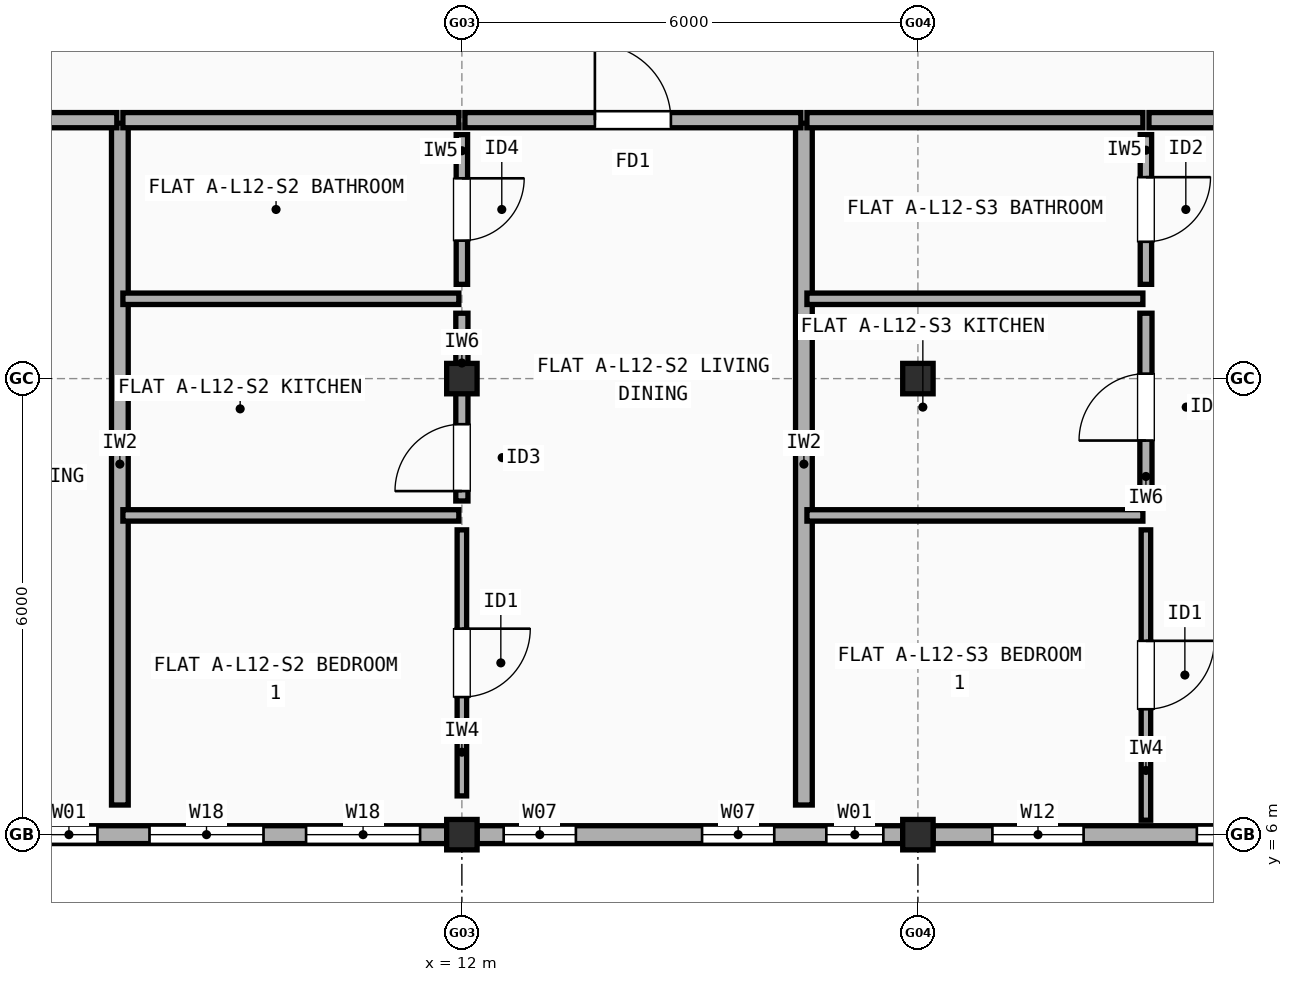
"""IFC4 building model, lengths in metres.
Left out: names, types, materials, properties, quantities, classifications, styles, units other than length and angle.
Written with IfcOpenShell. Run it as: python <this file> out.ifc"""

import sys

from ifc_helpers import new_model, si_unit, direction, frame, frame_2d, origin, origin_2d, place, context, subcontext, project, spatial, rectangle, extrude, element, fill, save


model = new_model("IFC4")
c1 = context("Model", 3, precision=1e-05, world=origin(), true_north=direction((0.0, 1.0)))
c2 = subcontext(c1, "Body", "Model", "MODEL_VIEW")
j1 = project(units=[si_unit("LENGTHUNIT", "METRE"), si_unit("PLANEANGLEUNIT", "RADIAN")], contexts=[c1])
p1 = place(None, origin())
s1 = spatial("IfcSite", under=j1, at=p1, CompositionType="ELEMENT")
p2 = place(p1, origin())
s2 = spatial("IfcBuilding", under=s1, at=p2, CompositionType="ELEMENT")
p3 = place(p2, frame((0.0, 0.0, 39.7)))
s3 = spatial("IfcBuildingStorey", under=s2, at=p3, CompositionType="ELEMENT", Elevation=39.7)
for number, where, z_axis, x_axis in (
    (1, (12.0, 6.0, 0.0), (0.0, 0.0, 1.0), (1.0, 0.0, 0.0)),
    (2, (12.0, 12.0, 0.0), (0.0, 0.0, 1.0), (1.0, 0.0, 0.0)),
    (3, (18.0, 6.0, 0.0), (0.0, 0.0, 1.0), (1.0, 0.0, 0.0)),
    (4, (18.0, 12.0, 0.0), (0.0, 0.0, 1.0), (1.0, 0.0, 0.0)),
):
    element("IfcColumn", number, at=place(p3, frame(where, z_axis=z_axis, x_axis=x_axis)), inside=s3, PredefinedType="COLUMN", context=c2, shape_type="SweptSolid", body=[
        extrude(rectangle(XDim=0.4, YDim=0.4, at=origin_2d()), origin(), (0.0, 0.0, 1.0), 3.0),
    ])
p4 = place(p3, frame((6.2, 6.0, 0.0), z_axis=(0.0, 0.0, 1.0), x_axis=(1.0, 0.0, 0.0)))
e5 = element("IfcWall", 5, at=p4, inside=s3, PredefinedType="STANDARD", context=c2, shape_type="SweptSolid", body=[
    extrude(rectangle(XDim=5.6, YDim=0.235, at=frame_2d((2.8, 0.0))), origin(), (0.0, 0.0, 1.0), 2.482),
])
p5 = place(p4, frame((0.255, 0.0, 0.9)))
e6 = element("IfcOpeningElement", 6, at=p5, cuts=e5, PredefinedType="OPENING", context=c2, shape_type="SweptSolid", body=[
    extrude(rectangle(XDim=0.75, YDim=1.15, at=frame_2d((0.375, 0.575))), frame((0.0, 0.127, 0.0), z_axis=(0.0, -1.0, 0.0), x_axis=(1.0, 0.0, 0.0)), (0.0, 0.0, 1.0), 0.255),
])
p6 = place(p4, frame((1.69, 0.0, 0.9)))
e7 = element("IfcOpeningElement", 7, at=p6, cuts=e5, PredefinedType="OPENING", context=c2, shape_type="SweptSolid", body=[
    extrude(rectangle(XDim=1.5, YDim=1.4, at=frame_2d((0.75, 0.7))), frame((0.0, 0.127, 0.0), z_axis=(0.0, -1.0, 0.0), x_axis=(1.0, 0.0, 0.0)), (0.0, 0.0, 1.0), 0.255),
])
p7 = place(p4, frame((3.75, 0.0, 0.9)))
e8 = element("IfcOpeningElement", 8, at=p7, cuts=e5, PredefinedType="OPENING", context=c2, shape_type="SweptSolid", body=[
    extrude(rectangle(XDim=1.5, YDim=1.4, at=frame_2d((0.75, 0.7))), frame((0.0, 0.127, 0.0), z_axis=(0.0, -1.0, 0.0), x_axis=(1.0, 0.0, 0.0)), (0.0, 0.0, 1.0), 0.255),
])
p8 = place(p3, frame((12.2, 6.0, 0.0), z_axis=(0.0, 0.0, 1.0), x_axis=(1.0, 0.0, 0.0)))
e9 = element("IfcWall", 9, at=p8, inside=s3, PredefinedType="STANDARD", context=c2, shape_type="SweptSolid", body=[
    extrude(rectangle(XDim=5.6, YDim=0.235, at=frame_2d((2.8, 0.0))), origin(), (0.0, 0.0, 1.0), 2.482),
])
p9 = place(p8, frame((0.35, 0.0, 0.9)))
e10 = element("IfcOpeningElement", 10, at=p9, cuts=e9, PredefinedType="OPENING", context=c2, shape_type="SweptSolid", body=[
    extrude(rectangle(XDim=0.95, YDim=1.35, at=frame_2d((0.475, 0.675))), frame((0.0, 0.127, 0.0), z_axis=(0.0, -1.0, 0.0), x_axis=(1.0, 0.0, 0.0)), (0.0, 0.0, 1.0), 0.255),
])
p10 = place(p8, frame((2.96, 0.0, 0.9)))
e11 = element("IfcOpeningElement", 11, at=p10, cuts=e9, PredefinedType="OPENING", context=c2, shape_type="SweptSolid", body=[
    extrude(rectangle(XDim=0.95, YDim=1.35, at=frame_2d((0.475, 0.675))), frame((0.0, 0.127, 0.0), z_axis=(0.0, -1.0, 0.0), x_axis=(1.0, 0.0, 0.0)), (0.0, 0.0, 1.0), 0.255),
])
p11 = place(p8, frame((4.595, 0.0, 0.9)))
e12 = element("IfcOpeningElement", 12, at=p11, cuts=e9, PredefinedType="OPENING", context=c2, shape_type="SweptSolid", body=[
    extrude(rectangle(XDim=0.75, YDim=1.15, at=frame_2d((0.375, 0.575))), frame((0.0, 0.127, 0.0), z_axis=(0.0, -1.0, 0.0), x_axis=(1.0, 0.0, 0.0)), (0.0, 0.0, 1.0), 0.255),
])
p12 = place(p3, frame((18.2, 6.0, 0.0), z_axis=(0.0, 0.0, 1.0), x_axis=(1.0, 0.0, 0.0)))
e13 = element("IfcWall", 13, at=p12, inside=s3, PredefinedType="STANDARD", context=c2, shape_type="SweptSolid", body=[
    extrude(rectangle(XDim=5.6, YDim=0.235, at=frame_2d((2.8, 0.0))), origin(), (0.0, 0.0, 1.0), 2.482),
])
p13 = place(p12, frame((0.78, 0.0, 0.9)))
e14 = element("IfcOpeningElement", 14, at=p13, cuts=e13, PredefinedType="OPENING", context=c2, shape_type="SweptSolid", body=[
    extrude(rectangle(XDim=1.2, YDim=1.35, at=frame_2d((0.6, 0.675))), frame((0.0, 0.127, 0.0), z_axis=(0.0, -1.0, 0.0), x_axis=(1.0, 0.0, 0.0)), (0.0, 0.0, 1.0), 0.255),
])
p14 = place(p12, frame((3.47, 0.0, 0.9)))
e15 = element("IfcOpeningElement", 15, at=p14, cuts=e13, PredefinedType="OPENING", context=c2, shape_type="SweptSolid", body=[
    extrude(rectangle(XDim=1.5, YDim=1.4, at=frame_2d((0.75, 0.7))), frame((0.0, 0.127, 0.0), z_axis=(0.0, -1.0, 0.0), x_axis=(1.0, 0.0, 0.0)), (0.0, 0.0, 1.0), 0.255),
])
p15 = place(p3, frame((7.5, 6.39, 0.0), z_axis=(0.0, 0.0, 1.0), x_axis=(0.0, 1.0, 0.0)))
e16 = element("IfcWall", 16, at=p15, inside=s3, PredefinedType="SOLIDWALL", context=c2, shape_type="SweptSolid", body=[
    extrude(rectangle(XDim=8.97, YDim=0.22, at=frame_2d((4.485, 0.0))), origin(), (0.0, 0.0, 1.0), 2.532),
])
p16 = place(p3, frame((3.04, 15.4, 0.0), z_axis=(0.0, 0.0, 1.0), x_axis=(1.0, 0.0, 0.0)))
e17 = element("IfcWall", 17, at=p16, inside=s3, PredefinedType="SOLIDWALL", context=c2, shape_type="SweptSolid", body=[
    extrude(rectangle(XDim=4.42, YDim=0.2, at=frame_2d((2.21, 0.0))), origin(), (0.0, 0.0, 1.0), 2.458),
])
p17 = place(p16, frame((1.685, 0.0, 0.0)))
e18 = element("IfcOpeningElement", 18, at=p17, cuts=e17, PredefinedType="OPENING", context=c2, shape_type="SweptSolid", body=[
    extrude(rectangle(XDim=1.05, YDim=2.15, at=frame_2d((0.525, 1.075))), frame((0.0, 0.11, 0.0), z_axis=(0.0, -1.0, 0.0), x_axis=(1.0, 0.0, 0.0)), (0.0, 0.0, 1.0), 0.22),
])
p18 = place(p3, frame((16.5, 6.39, 0.0), z_axis=(0.0, 0.0, 1.0), x_axis=(0.0, 1.0, 0.0)))
e19 = element("IfcWall", 19, at=p18, inside=s3, PredefinedType="SOLIDWALL", context=c2, shape_type="SweptSolid", body=[
    extrude(rectangle(XDim=8.97, YDim=0.22, at=frame_2d((4.485, 0.0))), origin(), (0.0, 0.0, 1.0), 2.532),
])
p19 = place(p3, frame((7.54, 15.4, 0.0), z_axis=(0.0, 0.0, 1.0), x_axis=(1.0, 0.0, 0.0)))
e20 = element("IfcWall", 20, at=p19, inside=s3, PredefinedType="SOLIDWALL", context=c2, shape_type="SweptSolid", body=[
    extrude(rectangle(XDim=4.42, YDim=0.2, at=frame_2d((2.21, 0.0))), origin(), (0.0, 0.0, 1.0), 2.458),
])
p20 = place(p3, frame((12.04, 15.4, 0.0), z_axis=(0.0, 0.0, 1.0), x_axis=(1.0, 0.0, 0.0)))
e21 = element("IfcWall", 21, at=p20, inside=s3, PredefinedType="SOLIDWALL", context=c2, shape_type="SweptSolid", body=[
    extrude(rectangle(XDim=4.42, YDim=0.2, at=frame_2d((2.21, 0.0))), origin(), (0.0, 0.0, 1.0), 2.458),
])
p21 = place(p20, frame((1.71, 0.0, 0.0)))
e22 = element("IfcOpeningElement", 22, at=p21, cuts=e21, PredefinedType="OPENING", context=c2, shape_type="SweptSolid", body=[
    extrude(rectangle(XDim=1.0, YDim=2.15, at=frame_2d((0.5, 1.075))), frame((0.0, 0.11, 0.0), z_axis=(0.0, -1.0, 0.0), x_axis=(1.0, 0.0, 0.0)), (0.0, 0.0, 1.0), 0.22),
])
p22 = place(p3, frame((12.0, 6.51, 0.0), z_axis=(0.0, 0.0, 1.0), x_axis=(0.0, 1.0, 0.0)))
e23 = element("IfcWall", 23, at=p22, inside=s3, PredefinedType="PARTITIONING", context=c2, shape_type="SweptSolid", body=[
    extrude(rectangle(XDim=3.5, YDim=0.125, at=frame_2d((1.75, 0.0))), origin(), (0.0, 0.0, 1.0), 2.508),
])
p23 = place(p22, frame((1.3, 0.0, 0.0)))
e24 = element("IfcOpeningElement", 24, at=p23, cuts=e23, PredefinedType="OPENING", context=c2, shape_type="SweptSolid", body=[
    extrude(rectangle(XDim=0.9, YDim=2.1, at=frame_2d((0.45, 1.05))), frame((0.0, 0.073, 0.0), z_axis=(0.0, -1.0, 0.0), x_axis=(1.0, 0.0, 0.0)), (0.0, 0.0, 1.0), 0.145),
])
p24 = place(p3, frame((12.0, 10.39, 0.0), z_axis=(0.0, 0.0, 1.0), x_axis=(0.0, 1.0, 0.0)))
e25 = element("IfcWall", 25, at=p24, inside=s3, PredefinedType="PLUMBINGWALL", context=c2, shape_type="SweptSolid", body=[
    extrude(rectangle(XDim=2.47, YDim=0.16, at=frame_2d((1.235, 0.0))), origin(), (0.0, 0.0, 1.0), 2.458),
])
p25 = place(p24, frame((0.13, 0.0, 0.0)))
e26 = element("IfcOpeningElement", 26, at=p25, cuts=e25, PredefinedType="OPENING", context=c2, shape_type="SweptSolid", body=[
    extrude(rectangle(XDim=0.88, YDim=2.1, at=frame_2d((0.44, 1.05))), frame((0.0, 0.09, 0.0), z_axis=(0.0, -1.0, 0.0), x_axis=(1.0, 0.0, 0.0)), (0.0, 0.0, 1.0), 0.18),
])
p26 = place(p3, frame((12.0, 13.24, 0.0), z_axis=(0.0, 0.0, 1.0), x_axis=(0.0, 1.0, 0.0)))
e27 = element("IfcWall", 27, at=p26, inside=s3, PredefinedType="PARTITIONING", context=c2, shape_type="SweptSolid", body=[
    extrude(rectangle(XDim=1.97, YDim=0.15, at=frame_2d((0.985, 0.0))), origin(), (0.0, 0.0, 1.0), 2.458),
])
p27 = place(p26, frame((0.575, 0.0, 0.0)))
e28 = element("IfcOpeningElement", 28, at=p27, cuts=e27, PredefinedType="OPENING", context=c2, shape_type="SweptSolid", body=[
    extrude(rectangle(XDim=0.82, YDim=2.08, at=frame_2d((0.41, 1.04))), frame((0.0, 0.085, 0.0), z_axis=(0.0, -1.0, 0.0), x_axis=(1.0, 0.0, 0.0)), (0.0, 0.0, 1.0), 0.17),
])
p28 = place(p3, frame((7.54, 10.2, 0.0), z_axis=(0.0, 0.0, 1.0), x_axis=(1.0, 0.0, 0.0)))
e29 = element("IfcWall", 29, at=p28, inside=s3, PredefinedType="PARTITIONING", context=c2, shape_type="SweptSolid", body=[
    extrude(rectangle(XDim=4.42, YDim=0.15, at=frame_2d((2.21, 0.0))), origin(), (0.0, 0.0, 1.0), 2.508),
])
p29 = place(p3, frame((7.54, 13.05, 0.0), z_axis=(0.0, 0.0, 1.0), x_axis=(1.0, 0.0, 0.0)))
e30 = element("IfcWall", 30, at=p29, inside=s3, PredefinedType="PARTITIONING", context=c2, shape_type="SweptSolid", body=[
    extrude(rectangle(XDim=4.42, YDim=0.15, at=frame_2d((2.21, 0.0))), origin(), (0.0, 0.0, 1.0), 2.458),
])
p30 = place(p3, frame((16.54, 15.4, 0.0), z_axis=(0.0, 0.0, 1.0), x_axis=(1.0, 0.0, 0.0)))
e31 = element("IfcWall", 31, at=p30, inside=s3, PredefinedType="SOLIDWALL", context=c2, shape_type="SweptSolid", body=[
    extrude(rectangle(XDim=4.42, YDim=0.2, at=frame_2d((2.21, 0.0))), origin(), (0.0, 0.0, 1.0), 2.548),
])
p31 = place(p3, frame((21.04, 15.4, 0.0), z_axis=(0.0, 0.0, 1.0), x_axis=(1.0, 0.0, 0.0)))
e32 = element("IfcWall", 32, at=p31, inside=s3, PredefinedType="SOLIDWALL", context=c2, shape_type="SweptSolid", body=[
    extrude(rectangle(XDim=5.92, YDim=0.2, at=frame_2d((2.96, 0.0))), origin(), (0.0, 0.0, 1.0), 2.548),
])
p32 = place(p31, frame((2.47, 0.0, 0.0)))
e33 = element("IfcOpeningElement", 33, at=p32, cuts=e32, PredefinedType="OPENING", context=c2, shape_type="SweptSolid", body=[
    extrude(rectangle(XDim=0.98, YDim=2.15, at=frame_2d((0.49, 1.075))), frame((0.0, 0.11, 0.0), z_axis=(0.0, -1.0, 0.0), x_axis=(1.0, 0.0, 0.0)), (0.0, 0.0, 1.0), 0.22),
])
p33 = place(p3, frame((21.0, 6.19, 0.0), z_axis=(0.0, 0.0, 1.0), x_axis=(0.0, 1.0, 0.0)))
e34 = element("IfcWall", 34, at=p33, inside=s3, PredefinedType="PARTITIONING", context=c2, shape_type="SweptSolid", body=[
    extrude(rectangle(XDim=3.82, YDim=0.125, at=frame_2d((1.91, 0.0))), origin(), (0.0, 0.0, 1.0), 3.0),
])
p34 = place(p33, frame((1.46, 0.0, 0.0)))
e35 = element("IfcOpeningElement", 35, at=p34, cuts=e34, PredefinedType="OPENING", context=c2, shape_type="SweptSolid", body=[
    extrude(rectangle(XDim=0.9, YDim=2.1, at=frame_2d((0.45, 1.05))), frame((0.0, 0.073, 0.0), z_axis=(0.0, -1.0, 0.0), x_axis=(1.0, 0.0, 0.0)), (0.0, 0.0, 1.0), 0.145),
])
p35 = place(p3, frame((21.0, 10.39, 0.0), z_axis=(0.0, 0.0, 1.0), x_axis=(0.0, 1.0, 0.0)))
e36 = element("IfcWall", 36, at=p35, inside=s3, PredefinedType="PLUMBINGWALL", context=c2, shape_type="SweptSolid", body=[
    extrude(rectangle(XDim=2.47, YDim=0.16, at=frame_2d((1.235, 0.0))), origin(), (0.0, 0.0, 1.0), 2.532),
])
p36 = place(p35, frame((0.795, 0.0, 0.0)))
e37 = element("IfcOpeningElement", 37, at=p36, cuts=e36, PredefinedType="OPENING", context=c2, shape_type="SweptSolid", body=[
    extrude(rectangle(XDim=0.88, YDim=2.1, at=frame_2d((0.44, 1.05))), frame((0.0, 0.09, 0.0), z_axis=(0.0, -1.0, 0.0), x_axis=(1.0, 0.0, 0.0)), (0.0, 0.0, 1.0), 0.18),
])
p37 = place(p3, frame((21.0, 13.24, 0.0), z_axis=(0.0, 0.0, 1.0), x_axis=(0.0, 1.0, 0.0)))
e38 = element("IfcWall", 38, at=p37, inside=s3, PredefinedType="PARTITIONING", context=c2, shape_type="SweptSolid", body=[
    extrude(rectangle(XDim=1.97, YDim=0.15, at=frame_2d((0.985, 0.0))), origin(), (0.0, 0.0, 1.0), 3.0),
])
p38 = place(p37, frame((0.56, 0.0, 0.0)))
e39 = element("IfcOpeningElement", 39, at=p38, cuts=e38, PredefinedType="OPENING", context=c2, shape_type="SweptSolid", body=[
    extrude(rectangle(XDim=0.85, YDim=2.1, at=frame_2d((0.425, 1.05))), frame((0.0, 0.085, 0.0), z_axis=(0.0, -1.0, 0.0), x_axis=(1.0, 0.0, 0.0)), (0.0, 0.0, 1.0), 0.17),
])
p39 = place(p3, frame((16.54, 10.2, 0.0), z_axis=(0.0, 0.0, 1.0), x_axis=(1.0, 0.0, 0.0)))
e40 = element("IfcWall", 40, at=p39, inside=s3, PredefinedType="PARTITIONING", context=c2, shape_type="SweptSolid", body=[
    extrude(rectangle(XDim=4.42, YDim=0.15, at=frame_2d((2.21, 0.0))), origin(), (0.0, 0.0, 1.0), 2.458),
])
p40 = place(p3, frame((16.54, 13.05, 0.0), z_axis=(0.0, 0.0, 1.0), x_axis=(1.0, 0.0, 0.0)))
e41 = element("IfcWall", 41, at=p40, inside=s3, PredefinedType="PARTITIONING", context=c2, shape_type="SweptSolid", body=[
    extrude(rectangle(XDim=4.42, YDim=0.15, at=frame_2d((2.21, 0.0))), origin(), (0.0, 0.0, 1.0), 2.548),
])
p41 = place(p5, origin())
e42 = element("IfcWindow", 42, at=p41, inside=s3, PartitioningType="SINGLE_PANEL", PredefinedType="WINDOW", context=c2, shape_type="SweptSolid", body=[
    extrude(rectangle(XDim=0.75, YDim=1.15, at=frame_2d((0.375, 0.575))), frame((0.0, 0.03, 0.0), z_axis=(0.0, -1.0, 0.0), x_axis=(1.0, 0.0, 0.0)), (0.0, 0.0, 1.0), 0.06),
])
fill(e6, e42)
p42 = place(p6, origin())
e43 = element("IfcWindow", 43, at=p42, inside=s3, PartitioningType="SINGLE_PANEL", PredefinedType="WINDOW", context=c2, shape_type="SweptSolid", body=[
    extrude(rectangle(XDim=1.5, YDim=1.4, at=frame_2d((0.75, 0.7))), frame((0.0, 0.03, 0.0), z_axis=(0.0, -1.0, 0.0), x_axis=(1.0, 0.0, 0.0)), (0.0, 0.0, 1.0), 0.06),
])
fill(e7, e43)
p43 = place(p7, origin())
e44 = element("IfcWindow", 44, at=p43, inside=s3, PartitioningType="SINGLE_PANEL", PredefinedType="WINDOW", context=c2, shape_type="SweptSolid", body=[
    extrude(rectangle(XDim=1.5, YDim=1.4, at=frame_2d((0.75, 0.7))), frame((0.0, 0.03, 0.0), z_axis=(0.0, -1.0, 0.0), x_axis=(1.0, 0.0, 0.0)), (0.0, 0.0, 1.0), 0.06),
])
fill(e8, e44)
p44 = place(p9, origin())
e45 = element("IfcWindow", 45, at=p44, inside=s3, PartitioningType="SINGLE_PANEL", PredefinedType="WINDOW", context=c2, shape_type="SweptSolid", body=[
    extrude(rectangle(XDim=0.95, YDim=1.35, at=frame_2d((0.475, 0.675))), frame((0.0, 0.03, 0.0), z_axis=(0.0, -1.0, 0.0), x_axis=(1.0, 0.0, 0.0)), (0.0, 0.0, 1.0), 0.06),
])
fill(e10, e45)
p45 = place(p10, origin())
e46 = element("IfcWindow", 46, at=p45, inside=s3, PartitioningType="SINGLE_PANEL", PredefinedType="WINDOW", context=c2, shape_type="SweptSolid", body=[
    extrude(rectangle(XDim=0.95, YDim=1.35, at=frame_2d((0.475, 0.675))), frame((0.0, 0.03, 0.0), z_axis=(0.0, -1.0, 0.0), x_axis=(1.0, 0.0, 0.0)), (0.0, 0.0, 1.0), 0.06),
])
fill(e11, e46)
p46 = place(p11, origin())
e47 = element("IfcWindow", 47, at=p46, inside=s3, PartitioningType="SINGLE_PANEL", PredefinedType="WINDOW", context=c2, shape_type="SweptSolid", body=[
    extrude(rectangle(XDim=0.75, YDim=1.15, at=frame_2d((0.375, 0.575))), frame((0.0, 0.03, 0.0), z_axis=(0.0, -1.0, 0.0), x_axis=(1.0, 0.0, 0.0)), (0.0, 0.0, 1.0), 0.06),
])
fill(e12, e47)
p47 = place(p13, origin())
e48 = element("IfcWindow", 48, at=p47, inside=s3, PartitioningType="SINGLE_PANEL", PredefinedType="WINDOW", context=c2, shape_type="SweptSolid", body=[
    extrude(rectangle(XDim=1.2, YDim=1.35, at=frame_2d((0.6, 0.675))), frame((0.0, 0.03, 0.0), z_axis=(0.0, -1.0, 0.0), x_axis=(1.0, 0.0, 0.0)), (0.0, 0.0, 1.0), 0.06),
])
fill(e14, e48)
p48 = place(p14, origin())
e49 = element("IfcWindow", 49, at=p48, inside=s3, PartitioningType="SINGLE_PANEL", PredefinedType="WINDOW", context=c2, shape_type="SweptSolid", body=[
    extrude(rectangle(XDim=1.5, YDim=1.4, at=frame_2d((0.75, 0.7))), frame((0.0, 0.03, 0.0), z_axis=(0.0, -1.0, 0.0), x_axis=(1.0, 0.0, 0.0)), (0.0, 0.0, 1.0), 0.06),
])
fill(e15, e49)
p49 = place(p21, origin())
e50 = element("IfcDoor", 50, at=p49, inside=s3, OperationType="SINGLE_SWING_LEFT", PredefinedType="DOOR", context=c2, shape_type="SweptSolid", body=[
    extrude(rectangle(XDim=1.0, YDim=2.15, at=frame_2d((0.5, 1.075))), frame((0.0, 0.025, 0.0), z_axis=(0.0, -1.0, 0.0), x_axis=(1.0, 0.0, 0.0)), (0.0, 0.0, 1.0), 0.05),
])
fill(e22, e50)
p50 = place(p23, origin())
e51 = element("IfcDoor", 51, at=p50, inside=s3, OperationType="SINGLE_SWING_RIGHT", PredefinedType="DOOR", context=c2, shape_type="SweptSolid", body=[
    extrude(rectangle(XDim=0.9, YDim=2.1, at=frame_2d((0.45, 1.05))), frame((0.0, 0.025, 0.0), z_axis=(0.0, -1.0, 0.0), x_axis=(1.0, 0.0, 0.0)), (0.0, 0.0, 1.0), 0.05),
])
fill(e24, e51)
p51 = place(p25, origin())
e52 = element("IfcDoor", 52, at=p51, inside=s3, OperationType="SINGLE_SWING_LEFT", PredefinedType="DOOR", context=c2, shape_type="SweptSolid", body=[
    extrude(rectangle(XDim=0.88, YDim=2.1, at=frame_2d((0.44, 1.05))), frame((0.0, 0.025, 0.0), z_axis=(0.0, -1.0, 0.0), x_axis=(1.0, 0.0, 0.0)), (0.0, 0.0, 1.0), 0.05),
])
fill(e26, e52)
p52 = place(p27, origin())
e53 = element("IfcDoor", 53, at=p52, inside=s3, OperationType="SINGLE_SWING_RIGHT", PredefinedType="DOOR", context=c2, shape_type="SweptSolid", body=[
    extrude(rectangle(XDim=0.82, YDim=2.08, at=frame_2d((0.41, 1.04))), frame((0.0, 0.025, 0.0), z_axis=(0.0, -1.0, 0.0), x_axis=(1.0, 0.0, 0.0)), (0.0, 0.0, 1.0), 0.05),
])
fill(e28, e53)
p53 = place(p34, origin())
e54 = element("IfcDoor", 54, at=p53, inside=s3, OperationType="SINGLE_SWING_RIGHT", PredefinedType="DOOR", context=c2, shape_type="SweptSolid", body=[
    extrude(rectangle(XDim=0.9, YDim=2.1, at=frame_2d((0.45, 1.05))), frame((0.0, 0.025, 0.0), z_axis=(0.0, -1.0, 0.0), x_axis=(1.0, 0.0, 0.0)), (0.0, 0.0, 1.0), 0.05),
])
fill(e35, e54)
p54 = place(p36, origin())
e55 = element("IfcDoor", 55, at=p54, inside=s3, OperationType="SINGLE_SWING_LEFT", PredefinedType="DOOR", context=c2, shape_type="SweptSolid", body=[
    extrude(rectangle(XDim=0.88, YDim=2.1, at=frame_2d((0.44, 1.05))), frame((0.0, 0.025, 0.0), z_axis=(0.0, -1.0, 0.0), x_axis=(1.0, 0.0, 0.0)), (0.0, 0.0, 1.0), 0.05),
])
fill(e37, e55)
p55 = place(p38, origin())
e56 = element("IfcDoor", 56, at=p55, inside=s3, OperationType="SINGLE_SWING_RIGHT", PredefinedType="DOOR", context=c2, shape_type="SweptSolid", body=[
    extrude(rectangle(XDim=0.85, YDim=2.1, at=frame_2d((0.425, 1.05))), frame((0.0, 0.025, 0.0), z_axis=(0.0, -1.0, 0.0), x_axis=(1.0, 0.0, 0.0)), (0.0, 0.0, 1.0), 0.05),
])
fill(e39, e56)
save(model, sys.argv[1])
